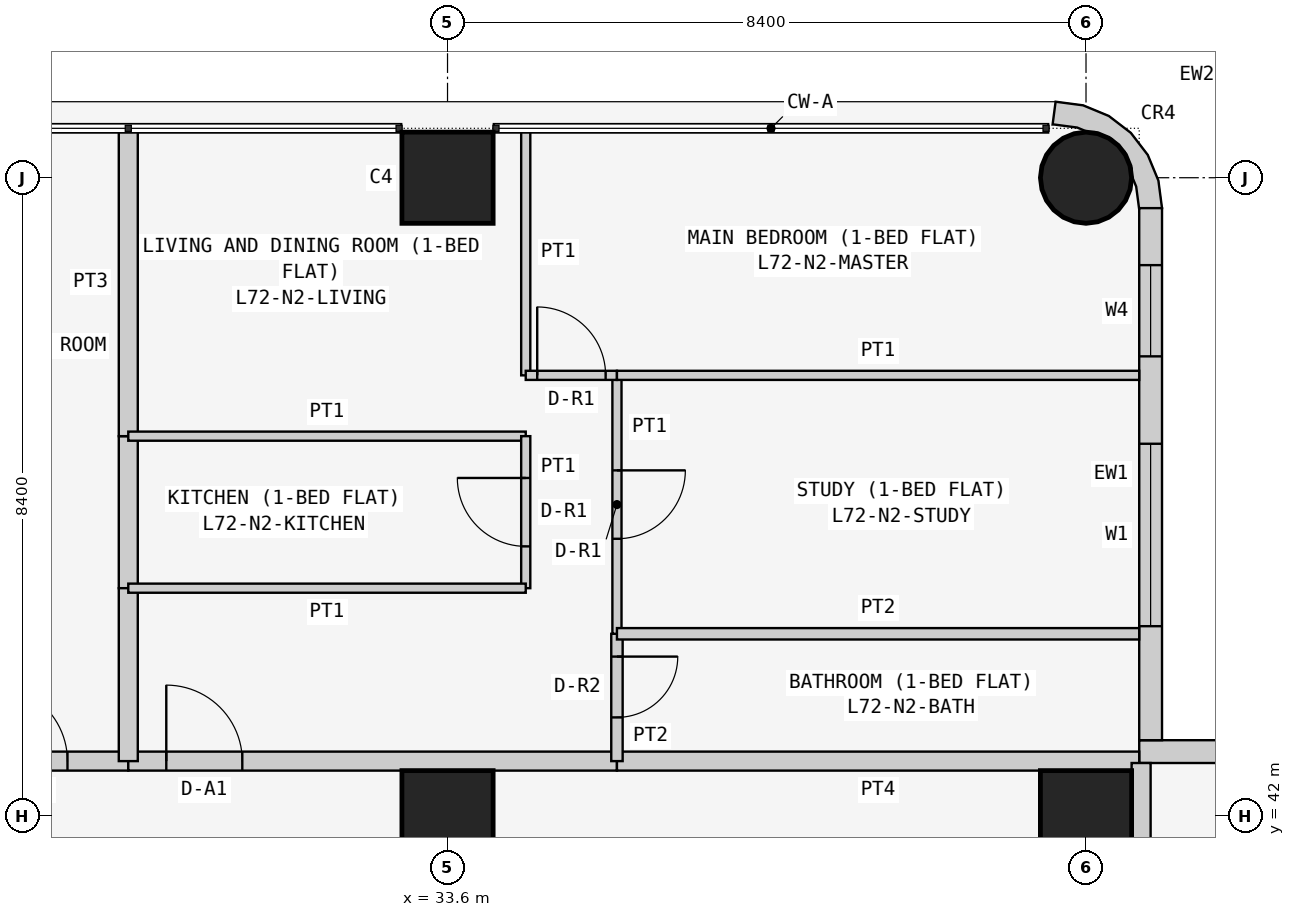
"""IFC4 building model, lengths in metres.
Left out: names, types, materials, properties, quantities, classifications, styles, units other than length and angle.
Written with IfcOpenShell. Run it as: python <this file> out.ifc"""

import sys

from ifc_helpers import new_model, si_unit, direction, frame, frame_2d, origin, origin_2d, place, context, subcontext, project, spatial, polyline, rectangle, circle, outline, extrude, element, fill, save


model = new_model("IFC4")
c1 = context("Model", 3, precision=1e-05, world=origin(), true_north=direction((0.0, 1.0)))
c2 = subcontext(c1, "Body", "Model", "MODEL_VIEW")
j1 = project(units=[si_unit("LENGTHUNIT", "METRE"), si_unit("PLANEANGLEUNIT", "RADIAN")], contexts=[c1])
p1 = place(None, origin())
s1 = spatial("IfcSite", under=j1, at=p1, CompositionType="ELEMENT")
p2 = place(p1, origin())
s2 = spatial("IfcBuilding", under=s1, at=p2, CompositionType="ELEMENT")
p3 = place(p2, frame((0.0, 0.0, 275.7)))
s3 = spatial("IfcBuildingStorey", under=s2, at=p3, CompositionType="ELEMENT", Elevation=275.7)
for number, where, z_axis, x_axis in (
    (1, (33.6, 42.0, 0.0), (0.0, 0.0, 1.0), (1.0, 0.0, 0.0)),
    (2, (33.6, 50.4, 0.0), (0.0, 0.0, 1.0), (1.0, 0.0, 0.0)),
    (3, (42.0, 42.0, 0.0), (0.0, 0.0, 1.0), (1.0, 0.0, 0.0)),
):
    element("IfcColumn", number, at=place(p3, frame(where, z_axis=z_axis, x_axis=x_axis)), inside=s3, PredefinedType="COLUMN", context=c2, shape_type="SweptSolid", body=[
        extrude(rectangle(XDim=1.2, YDim=1.2, at=origin_2d()), origin(), (0.0, 0.0, 1.0), 3.6),
    ])
p4 = place(p3, frame((42.0, 50.4, 0.0), z_axis=(0.0, 0.0, 1.0), x_axis=(1.0, 0.0, 0.0)))
e4 = element("IfcColumn", 4, at=p4, inside=s3, PredefinedType="COLUMN", context=c2, shape_type="SweptSolid", body=[
    extrude(circle(Radius=0.6, at=origin_2d()), origin(), (0.0, 0.0, 1.0), 3.6),
])
p5 = place(p3, frame((50.0, 42.85, 0.0), z_axis=(0.0, 0.0, 1.0), x_axis=(-1.0, 0.0, 0.0)))
e5 = element("IfcWall", 5, at=p5, inside=s3, PredefinedType="SOLIDWALL", context=c2, shape_type="SweptSolid", body=[
    extrude(rectangle(XDim=7.3, YDim=0.3, at=frame_2d((3.65, 0.0))), origin(), (0.0, 0.0, 1.0), 3.45),
])
p6 = place(p5, frame((3.1, 0.0, 0.9)))
e6 = element("IfcOpeningElement", 6, at=p6, cuts=e5, PredefinedType="OPENING", context=c2, shape_type="SweptSolid", body=[
    extrude(rectangle(XDim=2.4, YDim=1.5, at=frame_2d((1.2, 0.75))), frame((0.0, 0.16, 0.0), z_axis=(0.0, -1.0, 0.0), x_axis=(1.0, 0.0, 0.0)), (0.0, 0.0, 1.0), 0.32),
])
p7 = place(p5, frame((0.75, 0.0, 0.9)))
e7 = element("IfcOpeningElement", 7, at=p7, cuts=e5, PredefinedType="OPENING", context=c2, shape_type="SweptSolid", body=[
    extrude(rectangle(XDim=1.2, YDim=1.5, at=frame_2d((0.6, 0.75))), frame((0.0, 0.16, 0.0), z_axis=(0.0, -1.0, 0.0), x_axis=(1.0, 0.0, 0.0)), (0.0, 0.0, 1.0), 0.32),
])
p8 = place(p3, frame((42.85, 43.0, 0.0), z_axis=(0.0, 0.0, 1.0), x_axis=(0.0, 1.0, 0.0)))
e8 = element("IfcWall", 8, at=p8, inside=s3, PredefinedType="SOLIDWALL", context=c2, shape_type="SweptSolid", body=[
    extrude(rectangle(XDim=7.0, YDim=0.3, at=frame_2d((3.5, 0.0))), origin(), (0.0, 0.0, 1.0), 3.45),
])
p9 = place(p8, frame((1.5, 0.0, 0.9)))
e9 = element("IfcOpeningElement", 9, at=p9, cuts=e8, PredefinedType="OPENING", context=c2, shape_type="SweptSolid", body=[
    extrude(rectangle(XDim=2.4, YDim=1.5, at=frame_2d((1.2, 0.75))), frame((0.0, 0.16, 0.0), z_axis=(0.0, -1.0, 0.0), x_axis=(1.0, 0.0, 0.0)), (0.0, 0.0, 1.0), 0.32),
])
p10 = place(p8, frame((5.05, 0.0, 0.9)))
e10 = element("IfcOpeningElement", 10, at=p10, cuts=e8, PredefinedType="OPENING", context=c2, shape_type="SweptSolid", body=[
    extrude(rectangle(XDim=1.2, YDim=1.5, at=frame_2d((0.6, 0.75))), frame((0.0, 0.16, 0.0), z_axis=(0.0, -1.0, 0.0), x_axis=(1.0, 0.0, 0.0)), (0.0, 0.0, 1.0), 0.32),
])
p11 = place(p3, frame((42.576, 50.038, 0.0), z_axis=(0.0, 0.0, 1.0), x_axis=(0.707106781187, 0.707106781187, 0.0)))
e11 = element("IfcWall", 11, at=p11, inside=s3, PredefinedType="SOLIDWALL", context=c2, shape_type="SweptSolid", body=[
    extrude(outline(polyline([(0.233, 0.114), (0.047, -0.129), (0.033, -0.143), (0.273, -0.327), (0.495, -0.037), (0.635, 0.3), (0.683, 0.663), (0.635, 1.025), (0.495, 1.363), (0.273, 1.653), (0.033, 1.469), (0.047, 1.455), (0.233, 1.212), (0.292, 1.069), (0.358, 1.003), (0.449, 0.782), (0.449, 0.543), (0.358, 0.322), (0.292, 0.257), (0.233, 0.114)])), origin(), (0.0, 0.0, 1.0), 3.45),
])
p12 = place(p3, frame((26.8, 42.725, 0.0), z_axis=(0.0, 0.0, 1.0), x_axis=(1.0, 0.0, 0.0)))
e12 = element("IfcWall", 12, at=p12, inside=s3, PredefinedType="PARTITIONING", context=c2, shape_type="SweptSolid", body=[
    extrude(rectangle(XDim=2.6, YDim=0.25, at=frame_2d((1.3, 0.0))), origin(), (0.0, 0.0, 1.0), 3.45),
])
p13 = place(p12, frame((0.8, 0.0, 0.0)))
e13 = element("IfcOpeningElement", 13, at=p13, cuts=e12, PredefinedType="OPENING", context=c2, shape_type="SweptSolid", body=[
    extrude(rectangle(XDim=1.0, YDim=2.1, at=frame_2d((0.5, 1.05))), frame((0.0, 0.135, 0.0), z_axis=(0.0, -1.0, 0.0), x_axis=(1.0, 0.0, 0.0)), (0.0, 0.0, 1.0), 0.27),
])
p14 = place(p3, frame((29.4, 42.725, 0.0), z_axis=(0.0, 0.0, 1.0), x_axis=(1.0, 0.0, 0.0)))
e14 = element("IfcWall", 14, at=p14, inside=s3, PredefinedType="PARTITIONING", context=c2, shape_type="SweptSolid", body=[
    extrude(rectangle(XDim=6.429, YDim=0.25, at=frame_2d((3.215, 0.0))), origin(), (0.0, 0.0, 1.0), 3.45),
])
p15 = place(p14, frame((0.5, 0.0, 0.0)))
e15 = element("IfcOpeningElement", 15, at=p15, cuts=e14, PredefinedType="OPENING", context=c2, shape_type="SweptSolid", body=[
    extrude(rectangle(XDim=1.0, YDim=2.1, at=frame_2d((0.5, 1.05))), frame((0.0, 0.135, 0.0), z_axis=(0.0, -1.0, 0.0), x_axis=(1.0, 0.0, 0.0)), (0.0, 0.0, 1.0), 0.27),
])
for number, where, z_axis, x_axis in (
    (16, (35.829, 42.725, 0.0), (0.0, 0.0, 1.0), (1.0, 0.0, 0.0)),
    (17, (42.725, 42.7, 0.0), (0.0, 0.0, 1.0), (0.0, -1.0, 0.0)),
):
    element("IfcWall", number, at=place(p3, frame(where, z_axis=z_axis, x_axis=x_axis)), inside=s3, PredefinedType="PARTITIONING", context=c2, shape_type="SweptSolid", body=[
        extrude(rectangle(XDim=6.871, YDim=0.25, at=frame_2d((3.436, 0.0))), origin(), (0.0, 0.0, 1.0), 3.45),
    ])
p16 = place(p3, frame((29.4, 47.0, 0.0), z_axis=(0.0, 0.0, 1.0), x_axis=(0.0, -1.0, 0.0)))
e18 = element("IfcWall", 18, at=p16, inside=s3, PredefinedType="PARTITIONING", context=c2, shape_type="SweptSolid", body=[
    extrude(rectangle(XDim=2.0, YDim=0.25, at=frame_2d((1.0, 0.0))), origin(), (0.0, 0.0, 1.0), 2.848),
])
p17 = place(p3, frame((29.4, 45.0, 0.0), z_axis=(0.0, 0.0, 1.0), x_axis=(0.0, -1.0, 0.0)))
e19 = element("IfcWall", 19, at=p17, inside=s3, PredefinedType="PARTITIONING", context=c2, shape_type="SweptSolid", body=[
    extrude(rectangle(XDim=2.275, YDim=0.25, at=frame_2d((1.137, 0.0))), origin(), (0.0, 0.0, 1.0), 2.848),
])
p18 = place(p3, frame((29.4, 51.05, 0.0), z_axis=(0.0, 0.0, 1.0), x_axis=(0.0, -1.0, 0.0)))
e20 = element("IfcWall", 20, at=p18, inside=s3, PredefinedType="PARTITIONING", context=c2, shape_type="SweptSolid", body=[
    extrude(rectangle(XDim=4.05, YDim=0.25, at=frame_2d((2.025, 0.0))), origin(), (0.0, 0.0, 1.0), 2.848),
])
p19 = place(p3, frame((29.4, 47.0, 0.0), z_axis=(0.0, 0.0, 1.0), x_axis=(1.0, 0.0, 0.0)))
e21 = element("IfcWall", 21, at=p19, inside=s3, PredefinedType="PARTITIONING", context=c2, shape_type="SweptSolid", body=[
    extrude(rectangle(XDim=5.229, YDim=0.12, at=frame_2d((2.615, 0.0))), origin(), (0.0, 0.0, 1.0), 3.45),
])
p20 = place(p3, frame((34.629, 47.0, 0.0), z_axis=(0.0, 0.0, 1.0), x_axis=(0.0, -1.0, 0.0)))
e22 = element("IfcWall", 22, at=p20, inside=s3, PredefinedType="PARTITIONING", context=c2, shape_type="SweptSolid", body=[
    extrude(rectangle(XDim=2.0, YDim=0.12, at=frame_2d((1.0, 0.0))), origin(), (0.0, 0.0, 1.0), 3.45),
])
p21 = place(p20, frame((0.55, 0.0, 0.0)))
e23 = element("IfcOpeningElement", 23, at=p21, cuts=e22, PredefinedType="OPENING", context=c2, shape_type="SweptSolid", body=[
    extrude(rectangle(XDim=0.9, YDim=2.1, at=frame_2d((0.45, 1.05))), frame((0.0, 0.07, 0.0), z_axis=(0.0, -1.0, 0.0), x_axis=(1.0, 0.0, 0.0)), (0.0, 0.0, 1.0), 0.14),
])
p22 = place(p3, frame((34.629, 45.0, 0.0), z_axis=(0.0, 0.0, 1.0), x_axis=(-1.0, 0.0, 0.0)))
e24 = element("IfcWall", 24, at=p22, inside=s3, PredefinedType="PARTITIONING", context=c2, shape_type="SweptSolid", body=[
    extrude(rectangle(XDim=5.229, YDim=0.12, at=frame_2d((2.615, 0.0))), origin(), (0.0, 0.0, 1.0), 3.45),
])
p23 = place(p3, frame((35.829, 44.4, 0.0), z_axis=(0.0, 0.0, 1.0), x_axis=(0.0, -1.0, 0.0)))
e25 = element("IfcWall", 25, at=p23, inside=s3, PredefinedType="PARTITIONING", context=c2, shape_type="SweptSolid", body=[
    extrude(rectangle(XDim=1.675, YDim=0.15, at=frame_2d((0.837, 0.0))), origin(), (0.0, 0.0, 1.0), 3.45),
])
p24 = place(p23, frame((0.3, 0.0, 0.0)))
e26 = element("IfcOpeningElement", 26, at=p24, cuts=e25, PredefinedType="OPENING", context=c2, shape_type="SweptSolid", body=[
    extrude(rectangle(XDim=0.8, YDim=2.1, at=frame_2d((0.4, 1.05))), frame((0.0, 0.085, 0.0), z_axis=(0.0, -1.0, 0.0), x_axis=(1.0, 0.0, 0.0)), (0.0, 0.0, 1.0), 0.17),
])
p25 = place(p3, frame((35.829, 47.8, 0.0), z_axis=(0.0, 0.0, 1.0), x_axis=(0.0, -1.0, 0.0)))
e27 = element("IfcWall", 27, at=p25, inside=s3, PredefinedType="PARTITIONING", context=c2, shape_type="SweptSolid", body=[
    extrude(rectangle(XDim=3.4, YDim=0.12, at=frame_2d((1.7, 0.0))), origin(), (0.0, 0.0, 1.0), 3.45),
])
p26 = place(p25, frame((1.25, 0.0, 0.0)))
e28 = element("IfcOpeningElement", 28, at=p26, cuts=e27, PredefinedType="OPENING", context=c2, shape_type="SweptSolid", body=[
    extrude(rectangle(XDim=0.9, YDim=2.1, at=frame_2d((0.45, 1.05))), frame((0.0, 0.07, 0.0), z_axis=(0.0, -1.0, 0.0), x_axis=(1.0, 0.0, 0.0)), (0.0, 0.0, 1.0), 0.14),
])
p27 = place(p3, frame((34.629, 51.05, 0.0), z_axis=(0.0, 0.0, 1.0), x_axis=(0.0, -1.0, 0.0)))
e29 = element("IfcWall", 29, at=p27, inside=s3, PredefinedType="PARTITIONING", context=c2, shape_type="SweptSolid", body=[
    extrude(rectangle(XDim=3.25, YDim=0.12, at=frame_2d((1.625, 0.0))), origin(), (0.0, 0.0, 1.0), 3.45),
])
p28 = place(p3, frame((34.629, 47.8, 0.0), z_axis=(0.0, 0.0, 1.0), x_axis=(1.0, 0.0, 0.0)))
e30 = element("IfcWall", 30, at=p28, inside=s3, PredefinedType="PARTITIONING", context=c2, shape_type="SweptSolid", body=[
    extrude(rectangle(XDim=1.2, YDim=0.12, at=frame_2d((0.6, 0.0))), origin(), (0.0, 0.0, 1.0), 3.45),
])
p29 = place(p28, frame((0.151, 0.0, 0.0)))
e31 = element("IfcOpeningElement", 31, at=p29, cuts=e30, PredefinedType="OPENING", context=c2, shape_type="SweptSolid", body=[
    extrude(rectangle(XDim=0.9, YDim=2.1, at=frame_2d((0.45, 1.05))), frame((0.0, 0.07, 0.0), z_axis=(0.0, -1.0, 0.0), x_axis=(1.0, 0.0, 0.0)), (0.0, 0.0, 1.0), 0.14),
])
p30 = place(p3, frame((35.829, 44.4, 0.0), z_axis=(0.0, 0.0, 1.0), x_axis=(1.0, 0.0, 0.0)))
e32 = element("IfcWall", 32, at=p30, inside=s3, PredefinedType="PARTITIONING", context=c2, shape_type="SweptSolid", body=[
    extrude(rectangle(XDim=6.871, YDim=0.15, at=frame_2d((3.436, 0.0))), origin(), (0.0, 0.0, 1.0), 3.45),
])
p31 = place(p3, frame((35.829, 47.8, 0.0), z_axis=(0.0, 0.0, 1.0), x_axis=(1.0, 0.0, 0.0)))
e33 = element("IfcWall", 33, at=p31, inside=s3, PredefinedType="PARTITIONING", context=c2, shape_type="SweptSolid", body=[
    extrude(rectangle(XDim=6.871, YDim=0.12, at=frame_2d((3.436, 0.0))), origin(), (0.0, 0.0, 1.0), 3.45),
])
p32 = place(p9, origin())
e34 = element("IfcWindow", 34, at=p32, inside=s3, PartitioningType="SINGLE_PANEL", PredefinedType="WINDOW", context=c2, shape_type="SweptSolid", body=[
    extrude(rectangle(XDim=2.4, YDim=1.5, at=frame_2d((1.2, 0.75))), frame((0.0, 0.03, 0.0), z_axis=(0.0, -1.0, 0.0), x_axis=(1.0, 0.0, 0.0)), (0.0, 0.0, 1.0), 0.06),
])
fill(e9, e34)
p33 = place(p10, origin())
e35 = element("IfcWindow", 35, at=p33, inside=s3, PartitioningType="SINGLE_PANEL", PredefinedType="WINDOW", context=c2, shape_type="SweptSolid", body=[
    extrude(rectangle(XDim=1.2, YDim=1.5, at=frame_2d((0.6, 0.75))), frame((0.0, 0.03, 0.0), z_axis=(0.0, -1.0, 0.0), x_axis=(1.0, 0.0, 0.0)), (0.0, 0.0, 1.0), 0.06),
])
fill(e10, e35)
p34 = place(p13, origin())
e36 = element("IfcDoor", 36, at=p34, inside=s3, OperationType="SINGLE_SWING_LEFT", PredefinedType="DOOR", context=c2, shape_type="SweptSolid", body=[
    extrude(rectangle(XDim=1.0, YDim=2.1, at=frame_2d((0.5, 1.05))), frame((0.0, 0.025, 0.0), z_axis=(0.0, -1.0, 0.0), x_axis=(1.0, 0.0, 0.0)), (0.0, 0.0, 1.0), 0.05),
])
fill(e13, e36)
p35 = place(p15, origin())
e37 = element("IfcDoor", 37, at=p35, inside=s3, OperationType="SINGLE_SWING_LEFT", PredefinedType="DOOR", context=c2, shape_type="SweptSolid", body=[
    extrude(rectangle(XDim=1.0, YDim=2.1, at=frame_2d((0.5, 1.05))), frame((0.0, 0.025, 0.0), z_axis=(0.0, -1.0, 0.0), x_axis=(1.0, 0.0, 0.0)), (0.0, 0.0, 1.0), 0.05),
])
fill(e15, e37)
p36 = place(p21, frame((0.9, 0.0, 0.0), z_axis=(0.0, 0.0, 1.0), x_axis=(-1.0, 0.0, 0.0)))
e38 = element("IfcDoor", 38, at=p36, inside=s3, OperationType="SINGLE_SWING_RIGHT", PredefinedType="DOOR", context=c2, shape_type="SweptSolid", body=[
    extrude(rectangle(XDim=0.9, YDim=2.1, at=frame_2d((0.45, 1.05))), frame((0.0, 0.025, 0.0), z_axis=(0.0, -1.0, 0.0), x_axis=(1.0, 0.0, 0.0)), (0.0, 0.0, 1.0), 0.05),
])
fill(e23, e38)
p37 = place(p24, origin())
e39 = element("IfcDoor", 39, at=p37, inside=s3, OperationType="SINGLE_SWING_LEFT", PredefinedType="DOOR", context=c2, shape_type="SweptSolid", body=[
    extrude(rectangle(XDim=0.8, YDim=2.1, at=frame_2d((0.4, 1.05))), frame((0.0, 0.025, 0.0), z_axis=(0.0, -1.0, 0.0), x_axis=(1.0, 0.0, 0.0)), (0.0, 0.0, 1.0), 0.05),
])
fill(e26, e39)
p38 = place(p26, origin())
e40 = element("IfcDoor", 40, at=p38, inside=s3, OperationType="SINGLE_SWING_LEFT", PredefinedType="DOOR", context=c2, shape_type="SweptSolid", body=[
    extrude(rectangle(XDim=0.9, YDim=2.1, at=frame_2d((0.45, 1.05))), frame((0.0, 0.025, 0.0), z_axis=(0.0, -1.0, 0.0), x_axis=(1.0, 0.0, 0.0)), (0.0, 0.0, 1.0), 0.05),
])
fill(e28, e40)
p39 = place(p29, origin())
e41 = element("IfcDoor", 41, at=p39, inside=s3, OperationType="SINGLE_SWING_LEFT", PredefinedType="DOOR", context=c2, shape_type="SweptSolid", body=[
    extrude(rectangle(XDim=0.9, YDim=2.1, at=frame_2d((0.45, 1.05))), frame((0.0, 0.025, 0.0), z_axis=(0.0, -1.0, 0.0), x_axis=(1.0, 0.0, 0.0)), (0.0, 0.0, 1.0), 0.05),
])
fill(e31, e41)
save(model, sys.argv[1])
